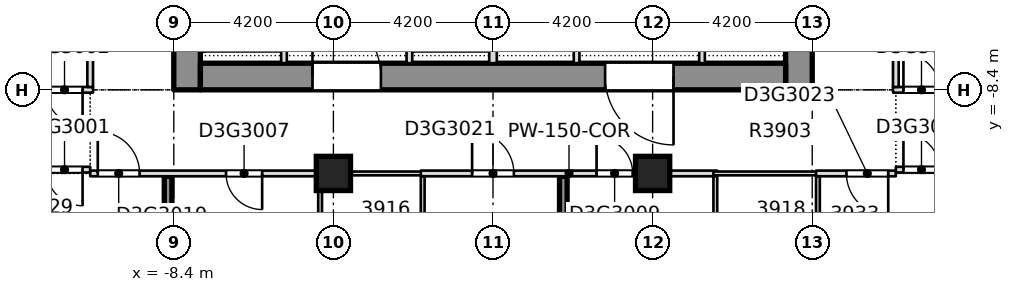
"""IFC4 building model, lengths in metres.
Left out: names, types, materials, properties, quantities, classifications, styles, units other than length and angle.
Written with IfcOpenShell. Run it as: python <this file> out.ifc"""

import sys

from ifc_helpers import new_model, si_unit, direction, frame, frame_2d, origin, origin_2d, place, context, subcontext, project, spatial, rectangle, extrude, element, fill, save


model = new_model("IFC4")
c1 = context("Model", 3, precision=1e-05, world=origin(), true_north=direction((0.0, 1.0)))
c2 = subcontext(c1, "Body", "Model", "MODEL_VIEW")
j1 = project(units=[si_unit("LENGTHUNIT", "METRE"), si_unit("PLANEANGLEUNIT", "RADIAN")], contexts=[c1])
p1 = place(None, origin())
s1 = spatial("IfcSite", under=j1, at=p1, CompositionType="ELEMENT")
p2 = place(p1, origin())
s2 = spatial("IfcBuilding", under=s1, at=p2, CompositionType="ELEMENT")
p3 = place(p2, frame((0.0, 0.0, 153.8)))
s3 = spatial("IfcBuildingStorey", under=s2, at=p3, CompositionType="ELEMENT", Elevation=153.8)
p4 = place(p3, frame((8.05, -8.4, -0.4), z_axis=(0.0, 0.0, 1.0), x_axis=(0.0, 1.0, 0.0)))
e1 = element("IfcWall", 1, at=p4, inside=s3, PredefinedType="SOLIDWALL", context=c2, shape_type="SweptSolid", body=[
    extrude(rectangle(XDim=30.15, YDim=0.7, at=frame_2d((15.075, 0.0))), origin(), (0.0, 0.0, 1.0), 3.45),
])
p5 = place(p4, frame((19.3, 0.0, 0.4)))
e2 = element("IfcOpeningElement", 2, at=p5, cuts=e1, PredefinedType="OPENING", context=c2, shape_type="SweptSolid", body=[
    extrude(rectangle(XDim=1.2, YDim=2.1, at=frame_2d((0.6, 1.05))), frame((0.0, 0.36, 0.0), z_axis=(0.0, -1.0, 0.0), x_axis=(1.0, 0.0, 0.0)), (0.0, 0.0, 1.0), 0.72),
])
p6 = place(p3, frame((-8.05, -8.4, -0.4), z_axis=(0.0, 0.0, 1.0), x_axis=(0.0, 1.0, 0.0)))
e3 = element("IfcWall", 3, at=p6, inside=s3, PredefinedType="SOLIDWALL", context=c2, shape_type="SweptSolid", body=[
    extrude(rectangle(XDim=30.15, YDim=0.7, at=frame_2d((15.075, 0.0))), origin(), (0.0, 0.0, 1.0), 3.45),
])
p7 = place(p6, frame((19.3, 0.0, 0.4)))
e4 = element("IfcOpeningElement", 4, at=p7, cuts=e3, PredefinedType="OPENING", context=c2, shape_type="SweptSolid", body=[
    extrude(rectangle(XDim=1.2, YDim=2.1, at=frame_2d((0.6, 1.05))), frame((0.0, 0.36, 0.0), z_axis=(0.0, -1.0, 0.0), x_axis=(1.0, 0.0, 0.0)), (0.0, 0.0, 1.0), 0.72),
])
p8 = place(p3, frame((-7.7, -8.05, -0.4), z_axis=(0.0, 0.0, 1.0), x_axis=(1.0, 0.0, 0.0)))
e5 = element("IfcWall", 5, at=p8, inside=s3, PredefinedType="SHEAR", context=c2, shape_type="SweptSolid", body=[
    extrude(rectangle(XDim=15.4, YDim=0.7, at=frame_2d((7.7, 0.0))), origin(), (0.0, 0.0, 1.0), 3.45),
])
p9 = place(p8, frame((2.95, 0.0, 0.4)))
e6 = element("IfcOpeningElement", 6, at=p9, cuts=e5, PredefinedType="OPENING", context=c2, shape_type="SweptSolid", body=[
    extrude(rectangle(XDim=1.8, YDim=2.1, at=frame_2d((0.9, 1.05))), frame((0.0, 0.36, 0.0), z_axis=(0.0, -1.0, 0.0), x_axis=(1.0, 0.0, 0.0)), (0.0, 0.0, 1.0), 0.72),
])
p10 = place(p8, frame((10.65, 0.0, 0.4)))
e7 = element("IfcOpeningElement", 7, at=p10, cuts=e5, PredefinedType="OPENING", context=c2, shape_type="SweptSolid", body=[
    extrude(rectangle(XDim=1.8, YDim=2.1, at=frame_2d((0.9, 1.05))), frame((0.0, 0.36, 0.0), z_axis=(0.0, -1.0, 0.0), x_axis=(1.0, 0.0, 0.0)), (0.0, 0.0, 1.0), 0.72),
])
for number, where, z_axis, x_axis in (
    (8, (-4.2, -10.6, -0.4), (0.0, 0.0, 1.0), (1.0, 0.0, 0.0)),
    (9, (4.2, -10.6, -0.4), (0.0, 0.0, 1.0), (1.0, 0.0, 0.0)),
):
    element("IfcColumn", number, at=place(p3, frame(where, z_axis=z_axis, x_axis=x_axis)), inside=s3, PredefinedType="COLUMN", context=c2, shape_type="SweptSolid", body=[
        extrude(rectangle(XDim=0.9, YDim=0.9, at=origin_2d()), origin(), (0.0, 0.0, 1.0), 3.45),
    ])
p11 = place(p3, frame((-10.6, -10.6, 0.0), z_axis=(0.0, 0.0, 1.0), x_axis=(1.0, 0.0, 0.0)))
e10 = element("IfcWall", 10, at=p11, inside=s3, PredefinedType="PARTITIONING", context=c2, shape_type="SweptSolid", body=[
    extrude(rectangle(XDim=6.1, YDim=0.15, at=frame_2d((3.05, 0.0))), origin(), (0.0, 0.0, 1.0), 3.05),
])
p12 = place(p11, frame((3.575, 0.0, 0.0)))
e11 = element("IfcOpeningElement", 11, at=p12, cuts=e10, PredefinedType="OPENING", context=c2, shape_type="SweptSolid", body=[
    extrude(rectangle(XDim=0.95, YDim=2.1, at=frame_2d((0.475, 1.05))), frame((0.0, 0.085, 0.0), z_axis=(0.0, -1.0, 0.0), x_axis=(1.0, 0.0, 0.0)), (0.0, 0.0, 1.0), 0.17),
])
p13 = place(p11, frame((0.2, 0.0, 0.0)))
e12 = element("IfcOpeningElement", 12, at=p13, cuts=e10, PredefinedType="OPENING", context=c2, shape_type="SweptSolid", body=[
    extrude(rectangle(XDim=1.1, YDim=2.1, at=frame_2d((0.55, 1.05))), frame((0.0, 0.085, 0.0), z_axis=(0.0, -1.0, 0.0), x_axis=(1.0, 0.0, 0.0)), (0.0, 0.0, 1.0), 0.17),
])
p14 = place(p3, frame((-4.6, -10.6, 0.0), z_axis=(0.0, 0.0, 1.0), x_axis=(1.0, 0.0, 0.0)))
e13 = element("IfcWall", 13, at=p14, inside=s3, PredefinedType="PARTITIONING", context=c2, shape_type="SweptSolid", body=[
    extrude(rectangle(XDim=2.8, YDim=0.1, at=frame_2d((1.4, 0.0))), origin(), (0.0, 0.0, 1.0), 3.05),
])
p15 = place(p3, frame((-1.9, -10.6, 0.0), z_axis=(0.0, 0.0, 1.0), x_axis=(1.0, 0.0, 0.0)))
e14 = element("IfcWall", 14, at=p15, inside=s3, PredefinedType="PARTITIONING", context=c2, shape_type="SweptSolid", body=[
    extrude(rectangle(XDim=7.8, YDim=0.15, at=frame_2d((3.9, 0.0))), origin(), (0.0, 0.0, 1.0), 3.05),
])
p16 = place(p15, frame((4.625, 0.0, 0.0)))
e15 = element("IfcOpeningElement", 15, at=p16, cuts=e14, PredefinedType="OPENING", context=c2, shape_type="SweptSolid", body=[
    extrude(rectangle(XDim=0.95, YDim=2.1, at=frame_2d((0.475, 1.05))), frame((0.0, 0.085, 0.0), z_axis=(0.0, -1.0, 0.0), x_axis=(1.0, 0.0, 0.0)), (0.0, 0.0, 1.0), 0.17),
])
p17 = place(p15, frame((1.35, 0.0, 0.0)))
e16 = element("IfcOpeningElement", 16, at=p17, cuts=e14, PredefinedType="OPENING", context=c2, shape_type="SweptSolid", body=[
    extrude(rectangle(XDim=1.1, YDim=2.1, at=frame_2d((0.55, 1.05))), frame((0.0, 0.085, 0.0), z_axis=(0.0, -1.0, 0.0), x_axis=(1.0, 0.0, 0.0)), (0.0, 0.0, 1.0), 0.17),
])
p18 = place(p3, frame((5.8, -10.6, 0.0), z_axis=(0.0, 0.0, 1.0), x_axis=(1.0, 0.0, 0.0)))
e17 = element("IfcWall", 17, at=p18, inside=s3, PredefinedType="PARTITIONING", context=c2, shape_type="SweptSolid", body=[
    extrude(rectangle(XDim=2.8, YDim=0.1, at=frame_2d((1.4, 0.0))), origin(), (0.0, 0.0, 1.0), 3.05),
])
p19 = place(p3, frame((8.5, -10.6, 0.0), z_axis=(0.0, 0.0, 1.0), x_axis=(1.0, 0.0, 0.0)))
e18 = element("IfcWall", 18, at=p19, inside=s3, PredefinedType="PARTITIONING", context=c2, shape_type="SweptSolid", body=[
    extrude(rectangle(XDim=2.1, YDim=0.15, at=frame_2d((1.05, 0.0))), origin(), (0.0, 0.0, 1.0), 3.05),
])
p20 = place(p19, frame((0.8, 0.0, 0.0)))
e19 = element("IfcOpeningElement", 19, at=p20, cuts=e18, PredefinedType="OPENING", context=c2, shape_type="SweptSolid", body=[
    extrude(rectangle(XDim=1.1, YDim=2.1, at=frame_2d((0.55, 1.05))), frame((0.0, 0.085, 0.0), z_axis=(0.0, -1.0, 0.0), x_axis=(1.0, 0.0, 0.0)), (0.0, 0.0, 1.0), 0.17),
])
p21 = place(p3, frame((-21.55, -10.5, 0.0), z_axis=(0.0, 0.0, 1.0), x_axis=(1.0, 0.0, 0.0)))
e20 = element("IfcWall", 20, at=p21, inside=s3, PredefinedType="PARTITIONING", context=c2, shape_type="SweptSolid", body=[
    extrude(rectangle(XDim=10.95, YDim=0.15, at=frame_2d((5.475, 0.0))), origin(), (0.0, 0.0, 1.0), 3.05),
])
p22 = place(p21, frame((9.8, 0.0, 0.0)))
e21 = element("IfcOpeningElement", 21, at=p22, cuts=e20, PredefinedType="OPENING", context=c2, shape_type="SweptSolid", body=[
    extrude(rectangle(XDim=0.95, YDim=2.1, at=frame_2d((0.475, 1.05))), frame((0.0, 0.085, 0.0), z_axis=(0.0, -1.0, 0.0), x_axis=(1.0, 0.0, 0.0)), (0.0, 0.0, 1.0), 0.17),
])
p23 = place(p3, frame((10.6, -10.5, 0.0), z_axis=(0.0, 0.0, 1.0), x_axis=(1.0, 0.0, 0.0)))
e22 = element("IfcWall", 22, at=p23, inside=s3, PredefinedType="PARTITIONING", context=c2, shape_type="SweptSolid", body=[
    extrude(rectangle(XDim=10.95, YDim=0.15, at=frame_2d((5.475, 0.0))), origin(), (0.0, 0.0, 1.0), 3.05),
])
p24 = place(p23, frame((0.2, 0.0, 0.0)))
e23 = element("IfcOpeningElement", 23, at=p24, cuts=e22, PredefinedType="OPENING", context=c2, shape_type="SweptSolid", body=[
    extrude(rectangle(XDim=0.95, YDim=2.1, at=frame_2d((0.475, 1.05))), frame((0.0, 0.085, 0.0), z_axis=(0.0, -1.0, 0.0), x_axis=(1.0, 0.0, 0.0)), (0.0, 0.0, 1.0), 0.17),
])
p25 = place(p3, frame((-21.55, -8.4, 0.0), z_axis=(0.0, 0.0, 1.0), x_axis=(1.0, 0.0, 0.0)))
e24 = element("IfcWall", 24, at=p25, inside=s3, PredefinedType="PARTITIONING", context=c2, shape_type="SweptSolid", body=[
    extrude(rectangle(XDim=11.025, YDim=0.15, at=frame_2d((5.513, 0.0))), origin(), (0.0, 0.0, 1.0), 3.05),
])
p26 = place(p25, frame((9.8, 0.0, 0.0)))
e25 = element("IfcOpeningElement", 25, at=p26, cuts=e24, PredefinedType="OPENING", context=c2, shape_type="SweptSolid", body=[
    extrude(rectangle(XDim=0.95, YDim=2.1, at=frame_2d((0.475, 1.05))), frame((0.0, 0.085, 0.0), z_axis=(0.0, -1.0, 0.0), x_axis=(1.0, 0.0, 0.0)), (0.0, 0.0, 1.0), 0.17),
])
p27 = place(p3, frame((10.525, -8.4, 0.0), z_axis=(0.0, 0.0, 1.0), x_axis=(1.0, 0.0, 0.0)))
e26 = element("IfcWall", 26, at=p27, inside=s3, PredefinedType="PARTITIONING", context=c2, shape_type="SweptSolid", body=[
    extrude(rectangle(XDim=11.025, YDim=0.15, at=frame_2d((5.513, 0.0))), origin(), (0.0, 0.0, 1.0), 3.05),
])
p28 = place(p27, frame((0.275, 0.0, 0.0)))
e27 = element("IfcOpeningElement", 27, at=p28, cuts=e26, PredefinedType="OPENING", context=c2, shape_type="SweptSolid", body=[
    extrude(rectangle(XDim=0.95, YDim=2.1, at=frame_2d((0.475, 1.05))), frame((0.0, 0.085, 0.0), z_axis=(0.0, -1.0, 0.0), x_axis=(1.0, 0.0, 0.0)), (0.0, 0.0, 1.0), 0.17),
])
p29 = place(p3, frame((-10.6, -8.325, 0.0), z_axis=(0.0, 0.0, 1.0), x_axis=(0.0, 1.0, 0.0)))
e28 = element("IfcWall", 28, at=p29, inside=s3, PredefinedType="PARTITIONING", context=c2, shape_type="SweptSolid", body=[
    extrude(rectangle(XDim=20.85, YDim=0.15, at=frame_2d((10.425, 0.0))), origin(), (0.0, 0.0, 1.0), 3.05),
])
p30 = place(p29, frame((13.745, 0.0, 0.0)))
e29 = element("IfcOpeningElement", 29, at=p30, cuts=e28, PredefinedType="OPENING", context=c2, shape_type="SweptSolid", body=[
    extrude(rectangle(XDim=0.95, YDim=2.1, at=frame_2d((0.475, 1.05))), frame((0.0, 0.085, 0.0), z_axis=(0.0, -1.0, 0.0), x_axis=(1.0, 0.0, 0.0)), (0.0, 0.0, 1.0), 0.17),
])
p31 = place(p29, frame((7.775, 0.0, 0.0)))
e30 = element("IfcOpeningElement", 30, at=p31, cuts=e28, PredefinedType="OPENING", context=c2, shape_type="SweptSolid", body=[
    extrude(rectangle(XDim=1.1, YDim=2.1, at=frame_2d((0.55, 1.05))), frame((0.0, 0.085, 0.0), z_axis=(0.0, -1.0, 0.0), x_axis=(1.0, 0.0, 0.0)), (0.0, 0.0, 1.0), 0.17),
])
p32 = place(p29, frame((5.625, 0.0, 0.0)))
e31 = element("IfcOpeningElement", 31, at=p32, cuts=e28, PredefinedType="OPENING", context=c2, shape_type="SweptSolid", body=[
    extrude(rectangle(XDim=1.0, YDim=2.1, at=frame_2d((0.5, 1.05))), frame((0.0, 0.085, 0.0), z_axis=(0.0, -1.0, 0.0), x_axis=(1.0, 0.0, 0.0)), (0.0, 0.0, 1.0), 0.17),
])
p33 = place(p29, frame((10.025, 0.0, 0.0)))
e32 = element("IfcOpeningElement", 32, at=p33, cuts=e28, PredefinedType="OPENING", context=c2, shape_type="SweptSolid", body=[
    extrude(rectangle(XDim=1.0, YDim=2.1, at=frame_2d((0.5, 1.05))), frame((0.0, 0.085, 0.0), z_axis=(0.0, -1.0, 0.0), x_axis=(1.0, 0.0, 0.0)), (0.0, 0.0, 1.0), 0.17),
])
for number, where, z_axis, x_axis in (
    (33, (-4.55, -13.248, 0.0), (0.0, 0.0, 1.0), (0.0, 1.0, 0.0)),
    (34, (-1.85, -13.248, 0.0), (0.0, 0.0, 1.0), (0.0, 1.0, 0.0)),
    (35, (5.85, -13.248, 0.0), (0.0, 0.0, 1.0), (0.0, 1.0, 0.0)),
    (36, (8.55, -13.248, 0.0), (0.0, 0.0, 1.0), (0.0, 1.0, 0.0)),
):
    element("IfcWall", number, at=place(p3, frame(where, z_axis=z_axis, x_axis=x_axis)), inside=s3, PredefinedType="PARTITIONING", context=c2, shape_type="SweptSolid", body=[
        extrude(rectangle(XDim=2.573, YDim=0.1, at=frame_2d((1.287, 0.0))), origin(), (0.0, 0.0, 1.0), 3.05),
    ])
p34 = place(p3, frame((10.6, -8.325, 0.0), z_axis=(0.0, 0.0, 1.0), x_axis=(0.0, 1.0, 0.0)))
e37 = element("IfcWall", 37, at=p34, inside=s3, PredefinedType="PARTITIONING", context=c2, shape_type="SweptSolid", body=[
    extrude(rectangle(XDim=2.775, YDim=0.15, at=frame_2d((1.387, 0.0))), origin(), (0.0, 0.0, 1.0), 3.05),
])
p35 = place(p3, frame((-5.5, -7.699, 0.0), z_axis=(0.0, 0.0, 1.0), x_axis=(0.0, 1.0, 0.0)))
e38 = element("IfcWall", 38, at=p35, inside=s3, PredefinedType="PARTITIONING", context=c2, shape_type="SweptSolid", body=[
    extrude(rectangle(XDim=12.124, YDim=0.15, at=frame_2d((6.062, 0.0))), origin(), (0.0, 0.0, 1.0), 3.05),
])
p36 = place(p35, frame((1.149, 0.0, 0.0)))
e39 = element("IfcOpeningElement", 39, at=p36, cuts=e38, PredefinedType="OPENING", context=c2, shape_type="SweptSolid", body=[
    extrude(rectangle(XDim=1.1, YDim=2.1, at=frame_2d((0.55, 1.05))), frame((0.0, 0.085, 0.0), z_axis=(0.0, -1.0, 0.0), x_axis=(1.0, 0.0, 0.0)), (0.0, 0.0, 1.0), 0.17),
])
p37 = place(p35, frame((4.149, 0.0, 0.0)))
e40 = element("IfcOpeningElement", 40, at=p37, cuts=e38, PredefinedType="OPENING", context=c2, shape_type="SweptSolid", body=[
    extrude(rectangle(XDim=1.1, YDim=2.1, at=frame_2d((0.55, 1.05))), frame((0.0, 0.085, 0.0), z_axis=(0.0, -1.0, 0.0), x_axis=(1.0, 0.0, 0.0)), (0.0, 0.0, 1.0), 0.17),
])
p38 = place(p35, frame((7.149, 0.0, 0.0)))
e41 = element("IfcOpeningElement", 41, at=p38, cuts=e38, PredefinedType="OPENING", context=c2, shape_type="SweptSolid", body=[
    extrude(rectangle(XDim=1.1, YDim=2.1, at=frame_2d((0.55, 1.05))), frame((0.0, 0.085, 0.0), z_axis=(0.0, -1.0, 0.0), x_axis=(1.0, 0.0, 0.0)), (0.0, 0.0, 1.0), 0.17),
])
p39 = place(p35, frame((10.149, 0.0, 0.0)))
e42 = element("IfcOpeningElement", 42, at=p39, cuts=e38, PredefinedType="OPENING", context=c2, shape_type="SweptSolid", body=[
    extrude(rectangle(XDim=1.1, YDim=2.1, at=frame_2d((0.55, 1.05))), frame((0.0, 0.085, 0.0), z_axis=(0.0, -1.0, 0.0), x_axis=(1.0, 0.0, 0.0)), (0.0, 0.0, 1.0), 0.17),
])
p40 = place(p3, frame((-2.2, -7.699, 0.0), z_axis=(0.0, 0.0, 1.0), x_axis=(0.0, 1.0, 0.0)))
e43 = element("IfcWall", 43, at=p40, inside=s3, PredefinedType="PARTITIONING", context=c2, shape_type="SweptSolid", body=[
    extrude(rectangle(XDim=12.124, YDim=0.15, at=frame_2d((6.062, 0.0))), origin(), (0.0, 0.0, 1.0), 3.05),
])
p41 = place(p40, frame((1.149, 0.0, 0.0)))
e44 = element("IfcOpeningElement", 44, at=p41, cuts=e43, PredefinedType="OPENING", context=c2, shape_type="SweptSolid", body=[
    extrude(rectangle(XDim=1.1, YDim=2.1, at=frame_2d((0.55, 1.05))), frame((0.0, 0.085, 0.0), z_axis=(0.0, -1.0, 0.0), x_axis=(1.0, 0.0, 0.0)), (0.0, 0.0, 1.0), 0.17),
])
p42 = place(p40, frame((4.974, 0.0, 0.0)))
e45 = element("IfcOpeningElement", 45, at=p42, cuts=e43, PredefinedType="OPENING", context=c2, shape_type="SweptSolid", body=[
    extrude(rectangle(XDim=0.95, YDim=2.1, at=frame_2d((0.475, 1.05))), frame((0.0, 0.085, 0.0), z_axis=(0.0, -1.0, 0.0), x_axis=(1.0, 0.0, 0.0)), (0.0, 0.0, 1.0), 0.17),
])
p43 = place(p40, frame((9.474, 0.0, 0.0)))
e46 = element("IfcOpeningElement", 46, at=p43, cuts=e43, PredefinedType="OPENING", context=c2, shape_type="SweptSolid", body=[
    extrude(rectangle(XDim=0.95, YDim=2.1, at=frame_2d((0.475, 1.05))), frame((0.0, 0.085, 0.0), z_axis=(0.0, -1.0, 0.0), x_axis=(1.0, 0.0, 0.0)), (0.0, 0.0, 1.0), 0.17),
])
p44 = place(p3, frame((0.0, -7.699, 0.0), z_axis=(0.0, 0.0, 1.0), x_axis=(0.0, 1.0, 0.0)))
e47 = element("IfcWall", 47, at=p44, inside=s3, PredefinedType="PARTITIONING", context=c2, shape_type="SweptSolid", body=[
    extrude(rectangle(XDim=12.124, YDim=0.2, at=frame_2d((6.062, 0.0))), origin(), (0.0, 0.0, 1.0), 3.05),
])
p45 = place(p3, frame((2.2, -7.699, 0.0), z_axis=(0.0, 0.0, 1.0), x_axis=(0.0, 1.0, 0.0)))
e48 = element("IfcWall", 48, at=p45, inside=s3, PredefinedType="PARTITIONING", context=c2, shape_type="SweptSolid", body=[
    extrude(rectangle(XDim=12.124, YDim=0.15, at=frame_2d((6.062, 0.0))), origin(), (0.0, 0.0, 1.0), 3.05),
])
p46 = place(p45, frame((5.724, 0.0, 0.0)))
e49 = element("IfcOpeningElement", 49, at=p46, cuts=e48, PredefinedType="OPENING", context=c2, shape_type="SweptSolid", body=[
    extrude(rectangle(XDim=0.95, YDim=2.1, at=frame_2d((0.475, 1.05))), frame((0.0, 0.085, 0.0), z_axis=(0.0, -1.0, 0.0), x_axis=(1.0, 0.0, 0.0)), (0.0, 0.0, 1.0), 0.17),
])
p47 = place(p3, frame((5.5, -7.699, 0.0), z_axis=(0.0, 0.0, 1.0), x_axis=(0.0, 1.0, 0.0)))
e50 = element("IfcWall", 50, at=p47, inside=s3, PredefinedType="PARTITIONING", context=c2, shape_type="SweptSolid", body=[
    extrude(rectangle(XDim=12.124, YDim=0.15, at=frame_2d((6.062, 0.0))), origin(), (0.0, 0.0, 1.0), 3.05),
])
p48 = place(p47, frame((1.724, 0.0, 0.0)))
e51 = element("IfcOpeningElement", 51, at=p48, cuts=e50, PredefinedType="OPENING", context=c2, shape_type="SweptSolid", body=[
    extrude(rectangle(XDim=0.95, YDim=2.1, at=frame_2d((0.475, 1.05))), frame((0.0, 0.085, 0.0), z_axis=(0.0, -1.0, 0.0), x_axis=(1.0, 0.0, 0.0)), (0.0, 0.0, 1.0), 0.17),
])
p49 = place(p47, frame((5.724, 0.0, 0.0)))
e52 = element("IfcOpeningElement", 52, at=p49, cuts=e50, PredefinedType="OPENING", context=c2, shape_type="SweptSolid", body=[
    extrude(rectangle(XDim=0.95, YDim=2.1, at=frame_2d((0.475, 1.05))), frame((0.0, 0.085, 0.0), z_axis=(0.0, -1.0, 0.0), x_axis=(1.0, 0.0, 0.0)), (0.0, 0.0, 1.0), 0.17),
])
p50 = place(p47, frame((9.724, 0.0, 0.0)))
e53 = element("IfcOpeningElement", 53, at=p50, cuts=e50, PredefinedType="OPENING", context=c2, shape_type="SweptSolid", body=[
    extrude(rectangle(XDim=0.95, YDim=2.1, at=frame_2d((0.475, 1.05))), frame((0.0, 0.085, 0.0), z_axis=(0.0, -1.0, 0.0), x_axis=(1.0, 0.0, 0.0)), (0.0, 0.0, 1.0), 0.17),
])
for number, where, z_axis, x_axis in (
    (54, (-8.55, -21.55, 0.0), (0.0, 0.0, 1.0), (0.0, 1.0, 0.0)),
    (55, (1.85, -21.55, 0.0), (0.0, 0.0, 1.0), (0.0, 1.0, 0.0)),
):
    element("IfcWall", number, at=place(p3, frame(where, z_axis=z_axis, x_axis=x_axis)), inside=s3, PredefinedType="SOLIDWALL", context=c2, shape_type="SweptSolid", body=[
        extrude(rectangle(XDim=10.875, YDim=0.2, at=frame_2d((5.438, 0.0))), origin(), (0.0, 0.0, 1.0), 3.05),
    ])
p51 = place(p22, origin())
e56 = element("IfcDoor", 56, at=p51, inside=s3, OperationType="SINGLE_SWING_RIGHT", PredefinedType="DOOR", context=c2, shape_type="SweptSolid", body=[
    extrude(rectangle(XDim=0.95, YDim=2.1, at=frame_2d((0.475, 1.05))), frame((0.0, 0.025, 0.0), z_axis=(0.0, -1.0, 0.0), x_axis=(1.0, 0.0, 0.0)), (0.0, 0.0, 1.0), 0.05),
])
fill(e21, e56)
p52 = place(p26, origin())
e57 = element("IfcDoor", 57, at=p52, inside=s3, OperationType="SINGLE_SWING_LEFT", PredefinedType="DOOR", context=c2, shape_type="SweptSolid", body=[
    extrude(rectangle(XDim=0.95, YDim=2.1, at=frame_2d((0.475, 1.05))), frame((0.0, 0.025, 0.0), z_axis=(0.0, -1.0, 0.0), x_axis=(1.0, 0.0, 0.0)), (0.0, 0.0, 1.0), 0.05),
])
fill(e25, e57)
p53 = place(p12, origin())
e58 = element("IfcDoor", 58, at=p53, inside=s3, OperationType="SINGLE_SWING_RIGHT", PredefinedType="DOOR", context=c2, shape_type="SweptSolid", body=[
    extrude(rectangle(XDim=0.95, YDim=2.1, at=frame_2d((0.475, 1.05))), frame((0.0, 0.025, 0.0), z_axis=(0.0, -1.0, 0.0), x_axis=(1.0, 0.0, 0.0)), (0.0, 0.0, 1.0), 0.05),
])
fill(e11, e58)
p54 = place(p16, origin())
e59 = element("IfcDoor", 59, at=p54, inside=s3, OperationType="SINGLE_SWING_RIGHT", PredefinedType="DOOR", context=c2, shape_type="SweptSolid", body=[
    extrude(rectangle(XDim=0.95, YDim=2.1, at=frame_2d((0.475, 1.05))), frame((0.0, 0.025, 0.0), z_axis=(0.0, -1.0, 0.0), x_axis=(1.0, 0.0, 0.0)), (0.0, 0.0, 1.0), 0.05),
])
fill(e15, e59)
p55 = place(p24, origin())
e60 = element("IfcDoor", 60, at=p55, inside=s3, OperationType="SINGLE_SWING_RIGHT", PredefinedType="DOOR", context=c2, shape_type="SweptSolid", body=[
    extrude(rectangle(XDim=0.95, YDim=2.1, at=frame_2d((0.475, 1.05))), frame((0.0, 0.025, 0.0), z_axis=(0.0, -1.0, 0.0), x_axis=(1.0, 0.0, 0.0)), (0.0, 0.0, 1.0), 0.05),
])
fill(e23, e60)
p56 = place(p28, origin())
e61 = element("IfcDoor", 61, at=p56, inside=s3, OperationType="SINGLE_SWING_LEFT", PredefinedType="DOOR", context=c2, shape_type="SweptSolid", body=[
    extrude(rectangle(XDim=0.95, YDim=2.1, at=frame_2d((0.475, 1.05))), frame((0.0, 0.025, 0.0), z_axis=(0.0, -1.0, 0.0), x_axis=(1.0, 0.0, 0.0)), (0.0, 0.0, 1.0), 0.05),
])
fill(e27, e61)
p57 = place(p13, origin())
e62 = element("IfcDoor", 62, at=p57, inside=s3, OperationType="SINGLE_SWING_RIGHT", PredefinedType="DOOR", context=c2, shape_type="SweptSolid", body=[
    extrude(rectangle(XDim=1.1, YDim=2.1, at=frame_2d((0.55, 1.05))), frame((0.0, 0.025, 0.0), z_axis=(0.0, -1.0, 0.0), x_axis=(1.0, 0.0, 0.0)), (0.0, 0.0, 1.0), 0.05),
])
fill(e12, e62)
p58 = place(p17, origin())
e63 = element("IfcDoor", 63, at=p58, inside=s3, OperationType="SINGLE_SWING_RIGHT", PredefinedType="DOOR", context=c2, shape_type="SweptSolid", body=[
    extrude(rectangle(XDim=1.1, YDim=2.1, at=frame_2d((0.55, 1.05))), frame((0.0, 0.025, 0.0), z_axis=(0.0, -1.0, 0.0), x_axis=(1.0, 0.0, 0.0)), (0.0, 0.0, 1.0), 0.05),
])
fill(e16, e63)
p59 = place(p20, origin())
e64 = element("IfcDoor", 64, at=p59, inside=s3, OperationType="SINGLE_SWING_RIGHT", PredefinedType="DOOR", context=c2, shape_type="SweptSolid", body=[
    extrude(rectangle(XDim=1.1, YDim=2.1, at=frame_2d((0.55, 1.05))), frame((0.0, 0.025, 0.0), z_axis=(0.0, -1.0, 0.0), x_axis=(1.0, 0.0, 0.0)), (0.0, 0.0, 1.0), 0.05),
])
fill(e19, e64)
p60 = place(p9, origin())
e65 = element("IfcDoor", 65, at=p60, inside=s3, OperationType="SINGLE_SWING_LEFT", PredefinedType="DOOR", context=c2, shape_type="SweptSolid", body=[
    extrude(rectangle(XDim=1.8, YDim=2.1, at=frame_2d((0.9, 1.05))), frame((0.0, 0.025, 0.0), z_axis=(0.0, -1.0, 0.0), x_axis=(1.0, 0.0, 0.0)), (0.0, 0.0, 1.0), 0.05),
])
fill(e6, e65)
p61 = place(p10, origin())
e66 = element("IfcDoor", 66, at=p61, inside=s3, OperationType="SINGLE_SWING_LEFT", PredefinedType="DOOR", context=c2, shape_type="SweptSolid", body=[
    extrude(rectangle(XDim=1.8, YDim=2.1, at=frame_2d((0.9, 1.05))), frame((0.0, 0.025, 0.0), z_axis=(0.0, -1.0, 0.0), x_axis=(1.0, 0.0, 0.0)), (0.0, 0.0, 1.0), 0.05),
])
fill(e7, e66)
save(model, sys.argv[1])
